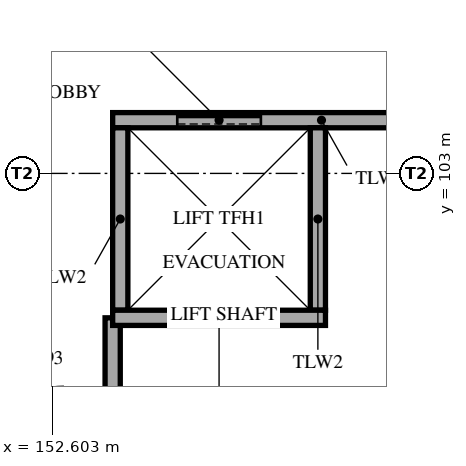
"""IFC4 building model, lengths in metres.
Left out: names, types, materials, properties, quantities, classifications, styles, units other than length and angle.
Written with IfcOpenShell. Run it as: python <this file> out.ifc"""

import sys

from ifc_helpers import new_model, si_unit, direction, frame, frame_2d, origin, place, context, subcontext, project, spatial, rectangle, extrude, element, fill, save


model = new_model("IFC4")
c1 = context("Model", 3, precision=1e-05, world=origin(), true_north=direction((0.0, 1.0)))
c2 = subcontext(c1, "Body", "Model", "MODEL_VIEW")
j1 = project(units=[si_unit("LENGTHUNIT", "METRE"), si_unit("PLANEANGLEUNIT", "RADIAN")], contexts=[c1])
p1 = place(None, origin())
s1 = spatial("IfcSite", under=j1, at=p1, CompositionType="ELEMENT")
p2 = place(p1, origin())
s2 = spatial("IfcBuilding", under=s1, at=p2, CompositionType="ELEMENT")
p3 = place(p2, frame((0.0, 0.0, 10.0)))
s3 = spatial("IfcBuildingStorey", under=s2, at=p3, CompositionType="ELEMENT", Elevation=10.0)
p4 = place(p3, frame((153.4, 103.7, 0.0), z_axis=(0.0, 0.0, 1.0), x_axis=(1.0, 0.0, 0.0)))
e1 = element("IfcWall", 1, at=p4, inside=s3, PredefinedType="SOLIDWALL", context=c2, shape_type="SweptSolid", body=[
    extrude(rectangle(XDim=5.495, YDim=0.2, at=frame_2d((2.748, 0.0))), origin(), (0.0, 0.0, 1.0), 4.59),
])
p5 = place(p4, frame((0.85, 0.0, 0.0)))
e2 = element("IfcOpeningElement", 2, at=p5, cuts=e1, PredefinedType="OPENING", context=c2, shape_type="SweptSolid", body=[
    extrude(rectangle(XDim=1.1, YDim=2.1, at=frame_2d((0.55, 1.05))), frame((0.0, 0.11, 0.0), z_axis=(0.0, -1.0, 0.0), x_axis=(1.0, 0.0, 0.0)), (0.0, 0.0, 1.0), 0.22),
])
p6 = place(p3, frame((153.4, 99.1, 0.0), z_axis=(0.0, 0.0, 1.0), x_axis=(0.0, 1.0, 0.0)))
e3 = element("IfcWall", 3, at=p6, inside=s3, PredefinedType="SOLIDWALL", context=c2, shape_type="SweptSolid", body=[
    extrude(rectangle(XDim=2.0, YDim=0.2, at=frame_2d((1.0, 0.0))), origin(), (0.0, 0.0, 1.0), 4.59),
])
for number, where, z_axis, x_axis in (
    (4, (153.5, 101.2, 0.0), (0.0, 0.0, 1.0), (0.0, 1.0, 0.0)),
    (5, (156.1, 101.2, 0.0), (0.0, 0.0, 1.0), (0.0, 1.0, 0.0)),
):
    element("IfcWall", number, at=place(p3, frame(where, z_axis=z_axis, x_axis=x_axis)), inside=s3, PredefinedType="SOLIDWALL", context=c2, shape_type="SweptSolid", body=[
        extrude(rectangle(XDim=2.4, YDim=0.2, at=frame_2d((1.2, 0.0))), origin(), (0.0, 0.0, 1.0), 4.59),
    ])
p7 = place(p3, frame((153.4, 101.1, 0.0), z_axis=(0.0, 0.0, 1.0), x_axis=(1.0, 0.0, 0.0)))
e6 = element("IfcWall", 6, at=p7, inside=s3, PredefinedType="SOLIDWALL", context=c2, shape_type="SweptSolid", body=[
    extrude(rectangle(XDim=2.8, YDim=0.2, at=frame_2d((1.4, 0.0))), origin(), (0.0, 0.0, 1.0), 4.59),
])
p8 = place(p5, origin())
e7 = element("IfcDoor", 7, at=p8, inside=s3, OperationType="SLIDING_TO_LEFT", PredefinedType="DOOR", context=c2, shape_type="SweptSolid", body=[
    extrude(rectangle(XDim=1.1, YDim=2.1, at=frame_2d((0.55, 1.05))), frame((0.0, 0.025, 0.0), z_axis=(0.0, -1.0, 0.0), x_axis=(1.0, 0.0, 0.0)), (0.0, 0.0, 1.0), 0.05),
])
fill(e2, e7)
save(model, sys.argv[1])
